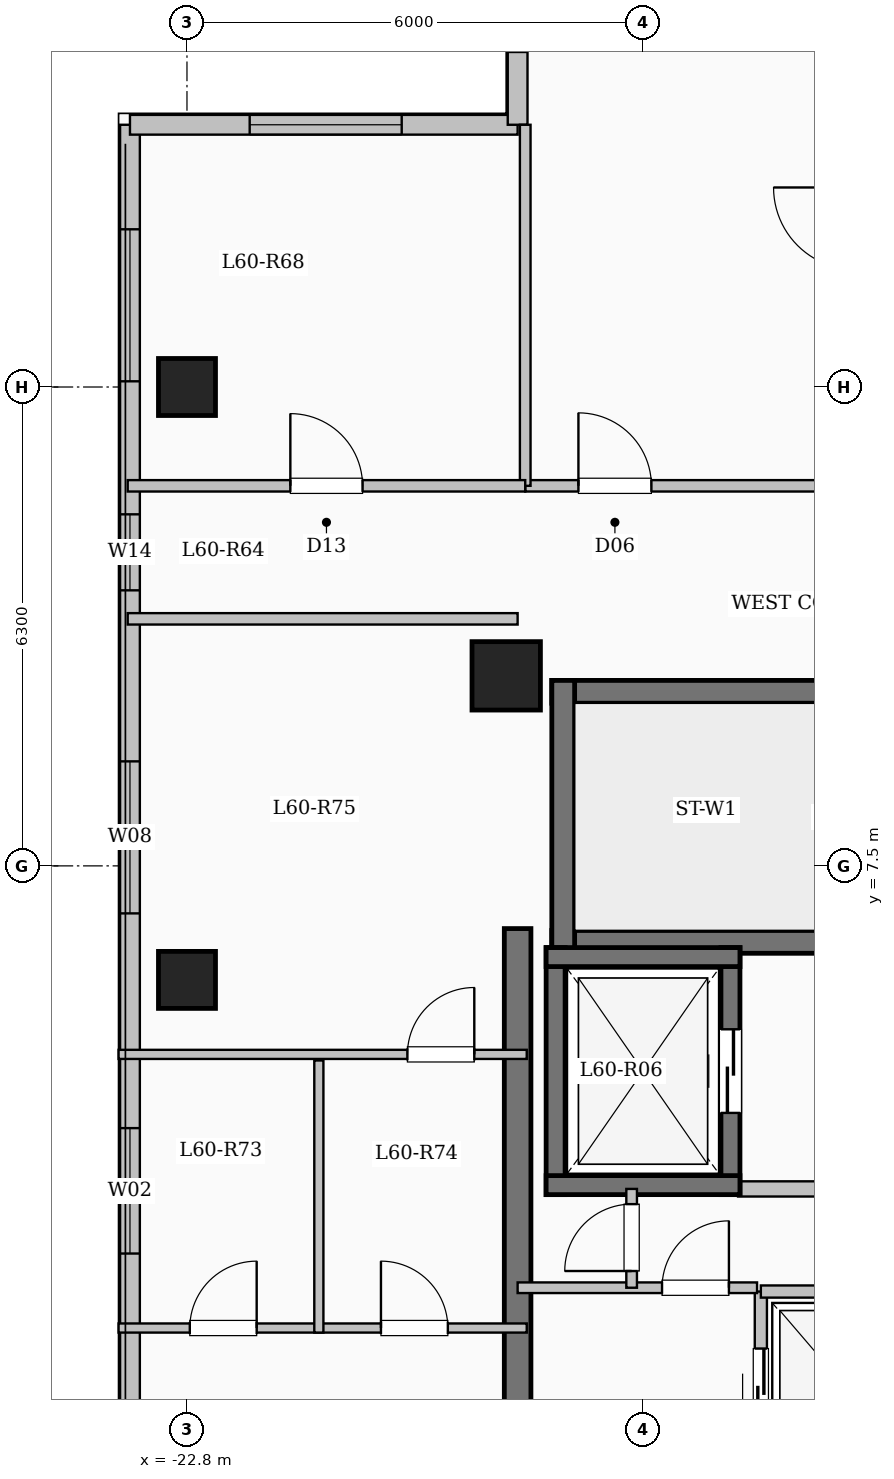
"""IFC4 building model, lengths in metres.
Left out: names, types, materials, properties, quantities, classifications, styles, units other than length and angle.
Written with IfcOpenShell. Run it as: python <this file> out.ifc"""

import sys

from ifc_helpers import new_model, si_unit, direction, frame, frame_2d, origin, origin_2d, place, context, subcontext, project, spatial, rectangle, extrude, element, fill, save


model = new_model("IFC4")
c1 = context("Model", 3, precision=1e-05, world=origin(), true_north=direction((0.0, 1.0)))
c2 = subcontext(c1, "Body", "Model", "MODEL_VIEW")
j1 = project(units=[si_unit("LENGTHUNIT", "METRE"), si_unit("PLANEANGLEUNIT", "RADIAN")], contexts=[c1])
p1 = place(None, origin())
s1 = spatial("IfcSite", under=j1, at=p1, CompositionType="ELEMENT")
p2 = place(p1, origin())
s2 = spatial("IfcBuilding", under=s1, at=p2, CompositionType="ELEMENT")
p3 = place(p2, frame((0.0, 0.0, 220.4)))
s3 = spatial("IfcBuildingStorey", under=s2, at=p3, CompositionType="ELEMENT", Elevation=220.4)
p4 = place(p3, frame((-18.6, 10.0, 0.0), z_axis=(0.0, 0.0, 1.0), x_axis=(1.0, 0.0, 0.0)))
e1 = element("IfcColumn", 1, at=p4, inside=s3, PredefinedType="COLUMN", context=c2, shape_type="SweptSolid", body=[
    extrude(rectangle(XDim=0.9, YDim=0.9, at=origin_2d()), origin(), (0.0, 0.0, 1.0), 3.35),
])
for number, where, z_axis, x_axis in (
    (2, (-22.8, 6.0, 0.0), (0.0, 0.0, 1.0), (1.0, 0.0, 0.0)),
    (3, (-22.8, 13.8, 0.0), (0.0, 0.0, 1.0), (1.0, 0.0, 0.0)),
):
    element("IfcColumn", number, at=place(p3, frame(where, z_axis=z_axis, x_axis=x_axis)), inside=s3, PredefinedType="COLUMN", context=c2, shape_type="SweptSolid", body=[
        extrude(rectangle(XDim=0.75, YDim=0.75, at=origin_2d()), origin(), (0.0, 0.0, 1.0), 3.35),
    ])
p5 = place(p3, frame((-23.55, -17.25, 0.0), z_axis=(0.0, 0.0, 1.0), x_axis=(0.0, 1.0, 0.0)))
e4 = element("IfcWall", 4, at=p5, inside=s3, PredefinedType="SOLIDWALL", context=c2, shape_type="SweptSolid", body=[
    extrude(rectangle(XDim=34.5, YDim=0.26, at=frame_2d((17.25, 0.0))), origin(), (0.0, 0.0, 1.0), 3.1),
])
p6 = place(p5, frame((2.825, 0.0, 0.9)))
e5 = element("IfcOpeningElement", 5, at=p6, cuts=e4, PredefinedType="OPENING", context=c2, shape_type="SweptSolid", body=[
    extrude(rectangle(XDim=2.2, YDim=1.75, at=frame_2d((1.1, 0.875))), frame((0.0, 0.14, 0.0), z_axis=(0.0, -1.0, 0.0), x_axis=(1.0, 0.0, 0.0)), (0.0, 0.0, 1.0), 0.28),
])
p7 = place(p5, frame((8.325, 0.0, 0.95)))
e6 = element("IfcOpeningElement", 6, at=p7, cuts=e4, PredefinedType="OPENING", context=c2, shape_type="SweptSolid", body=[
    extrude(rectangle(XDim=1.2, YDim=1.5, at=frame_2d((0.6, 0.75))), frame((0.0, 0.14, 0.0), z_axis=(0.0, -1.0, 0.0), x_axis=(1.0, 0.0, 0.0)), (0.0, 0.0, 1.0), 0.28),
])
p8 = place(p5, frame((13.25, 0.0, 0.9)))
e7 = element("IfcOpeningElement", 7, at=p8, cuts=e4, PredefinedType="OPENING", context=c2, shape_type="SweptSolid", body=[
    extrude(rectangle(XDim=2.2, YDim=1.75, at=frame_2d((1.1, 0.875))), frame((0.0, 0.14, 0.0), z_axis=(0.0, -1.0, 0.0), x_axis=(1.0, 0.0, 0.0)), (0.0, 0.0, 1.0), 0.28),
])
p9 = place(p5, frame((19.65, 0.0, 0.9)))
e8 = element("IfcOpeningElement", 8, at=p9, cuts=e4, PredefinedType="OPENING", context=c2, shape_type="SweptSolid", body=[
    extrude(rectangle(XDim=1.65, YDim=1.6, at=frame_2d((0.825, 0.8))), frame((0.0, 0.14, 0.0), z_axis=(0.0, -1.0, 0.0), x_axis=(1.0, 0.0, 0.0)), (0.0, 0.0, 1.0), 0.28),
])
p10 = place(p5, frame((24.125, 0.0, 0.9)))
e9 = element("IfcOpeningElement", 9, at=p10, cuts=e4, PredefinedType="OPENING", context=c2, shape_type="SweptSolid", body=[
    extrude(rectangle(XDim=2.0, YDim=1.7, at=frame_2d((1.0, 0.85))), frame((0.0, 0.14, 0.0), z_axis=(0.0, -1.0, 0.0), x_axis=(1.0, 0.0, 0.0)), (0.0, 0.0, 1.0), 0.28),
])
p11 = place(p5, frame((28.375, 0.0, 0.95)))
e10 = element("IfcOpeningElement", 10, at=p11, cuts=e4, PredefinedType="OPENING", context=c2, shape_type="SweptSolid", body=[
    extrude(rectangle(XDim=1.0, YDim=1.5, at=frame_2d((0.5, 0.75))), frame((0.0, 0.14, 0.0), z_axis=(0.0, -1.0, 0.0), x_axis=(1.0, 0.0, 0.0)), (0.0, 0.0, 1.0), 0.28),
])
p12 = place(p5, frame((31.125, 0.0, 0.9)))
e11 = element("IfcOpeningElement", 11, at=p12, cuts=e4, PredefinedType="OPENING", context=c2, shape_type="SweptSolid", body=[
    extrude(rectangle(XDim=2.0, YDim=1.7, at=frame_2d((1.0, 0.85))), frame((0.0, 0.14, 0.0), z_axis=(0.0, -1.0, 0.0), x_axis=(1.0, 0.0, 0.0)), (0.0, 0.0, 1.0), 0.28),
])
p13 = place(p3, frame((-23.55, 17.25, 0.0), z_axis=(0.0, 0.0, 1.0), x_axis=(1.0, 0.0, 0.0)))
e12 = element("IfcWall", 12, at=p13, inside=s3, PredefinedType="SOLIDWALL", context=c2, shape_type="SweptSolid", body=[
    extrude(rectangle(XDim=5.1, YDim=0.26, at=frame_2d((2.55, 0.0))), origin(), (0.0, 0.0, 1.0), 3.1),
])
p14 = place(p13, frame((1.575, 0.0, 0.9)))
e13 = element("IfcOpeningElement", 13, at=p14, cuts=e12, PredefinedType="OPENING", context=c2, shape_type="SweptSolid", body=[
    extrude(rectangle(XDim=2.0, YDim=1.7, at=frame_2d((1.0, 0.85))), frame((0.0, 0.14, 0.0), z_axis=(0.0, -1.0, 0.0), x_axis=(1.0, 0.0, 0.0)), (0.0, 0.0, 1.0), 0.28),
])
p15 = place(p3, frame((-18.45, 17.25, 0.0), z_axis=(0.0, 0.0, 1.0), x_axis=(0.0, 1.0, 0.0)))
e14 = element("IfcWall", 14, at=p15, inside=s3, PredefinedType="SOLIDWALL", context=c2, shape_type="SweptSolid", body=[
    extrude(rectangle(XDim=3.6, YDim=0.26, at=frame_2d((1.8, 0.0))), origin(), (0.0, 0.0, 1.0), 3.1),
])
p16 = place(p15, frame((0.958, 0.0, 0.9)))
e15 = element("IfcOpeningElement", 15, at=p16, cuts=e14, PredefinedType="OPENING", context=c2, shape_type="SweptSolid", body=[
    extrude(rectangle(XDim=1.65, YDim=1.6, at=frame_2d((0.825, 0.8))), frame((0.0, 0.14, 0.0), z_axis=(0.0, -1.0, 0.0), x_axis=(1.0, 0.0, 0.0)), (0.0, 0.0, 1.0), 0.28),
])
p17 = place(p3, frame((-18.0, 9.79, 0.0), z_axis=(0.0, 0.0, 1.0), x_axis=(1.0, 0.0, 0.0)))
e16 = element("IfcWall", 16, at=p17, inside=s3, PredefinedType="SHEAR", context=c2, shape_type="SweptSolid", body=[
    extrude(rectangle(XDim=8.0, YDim=0.3, at=frame_2d((4.0, 0.0))), origin(), (0.0, 0.0, 1.0), 3.35),
])
p18 = place(p3, frame((-18.0, 6.5, 0.0), z_axis=(0.0, 0.0, 1.0), x_axis=(1.0, 0.0, 0.0)))
e17 = element("IfcWall", 17, at=p18, inside=s3, PredefinedType="SHEAR", context=c2, shape_type="SweptSolid", body=[
    extrude(rectangle(XDim=8.0, YDim=0.3, at=frame_2d((4.0, 0.0))), origin(), (0.0, 0.0, 1.0), 3.35),
])
p19 = place(p18, frame((6.45, 0.0, 0.0)))
e18 = element("IfcOpeningElement", 18, at=p19, cuts=e17, PredefinedType="OPENING", context=c2, shape_type="SweptSolid", body=[
    extrude(rectangle(XDim=1.0, YDim=2.15, at=frame_2d((0.5, 1.075))), frame((0.0, 0.16, 0.0), z_axis=(0.0, -1.0, 0.0), x_axis=(1.0, 0.0, 0.0)), (0.0, 0.0, 1.0), 0.32),
])
p20 = place(p3, frame((-17.85, 6.35, 0.0), z_axis=(0.0, 0.0, 1.0), x_axis=(0.0, 1.0, 0.0)))
e19 = element("IfcWall", 19, at=p20, inside=s3, PredefinedType="SHEAR", context=c2, shape_type="SweptSolid", body=[
    extrude(rectangle(XDim=3.59, YDim=0.3, at=frame_2d((1.795, 0.0))), origin(), (0.0, 0.0, 1.0), 3.35),
])
p21 = place(p3, frame((-15.55, 3.25, 0.0), z_axis=(0.0, 0.0, 1.0), x_axis=(1.0, 0.0, 0.0)))
e20 = element("IfcWall", 20, at=p21, inside=s3, PredefinedType="SOLIDWALL", context=c2, shape_type="SweptSolid", body=[
    extrude(rectangle(XDim=5.4, YDim=0.2, at=frame_2d((2.7, 0.0))), origin(), (0.0, 0.0, 1.0), 3.1),
])
p22 = place(p3, frame((-17.95, 3.175, 0.0), z_axis=(0.0, 0.0, 1.0), x_axis=(0.0, 1.0, 0.0)))
e21 = element("IfcWall", 21, at=p22, inside=s3, PredefinedType="SHEAR", context=c2, shape_type="SweptSolid", body=[
    extrude(rectangle(XDim=3.25, YDim=0.25, at=frame_2d((1.625, 0.0))), origin(), (0.0, 0.0, 1.0), 3.35),
])
p23 = place(p3, frame((-15.65, 3.175, 0.0), z_axis=(0.0, 0.0, 1.0), x_axis=(0.0, 1.0, 0.0)))
e22 = element("IfcWall", 22, at=p23, inside=s3, PredefinedType="SHEAR", context=c2, shape_type="SweptSolid", body=[
    extrude(rectangle(XDim=3.25, YDim=0.25, at=frame_2d((1.625, 0.0))), origin(), (0.0, 0.0, 1.0), 3.35),
])
p24 = place(p23, frame((1.075, 0.0, 0.0)))
e23 = element("IfcOpeningElement", 23, at=p24, cuts=e22, PredefinedType="OPENING", context=c2, shape_type="SweptSolid", body=[
    extrude(rectangle(XDim=1.1, YDim=2.15, at=frame_2d((0.55, 1.075))), frame((0.0, 0.135, 0.0), z_axis=(0.0, -1.0, 0.0), x_axis=(1.0, 0.0, 0.0)), (0.0, 0.0, 1.0), 0.27),
])
for number, where, z_axis, x_axis in (
    (24, (-18.075, 3.3, 0.0), (0.0, 0.0, 1.0), (1.0, 0.0, 0.0)),
    (25, (-18.075, 6.3, 0.0), (0.0, 0.0, 1.0), (1.0, 0.0, 0.0)),
):
    element("IfcWall", number, at=place(p3, frame(where, z_axis=z_axis, x_axis=x_axis)), inside=s3, PredefinedType="SHEAR", context=c2, shape_type="SweptSolid", body=[
        extrude(rectangle(XDim=2.55, YDim=0.25, at=frame_2d((1.275, 0.0))), origin(), (0.0, 0.0, 1.0), 3.35),
    ])
p25 = place(p3, frame((-15.25, -0.7, 0.0), z_axis=(0.0, 0.0, 1.0), x_axis=(0.0, 1.0, 0.0)))
e26 = element("IfcWall", 26, at=p25, inside=s3, PredefinedType="SOLIDWALL", context=c2, shape_type="SweptSolid", body=[
    extrude(rectangle(XDim=2.6, YDim=0.16, at=frame_2d((1.3, 0.0))), origin(), (0.0, 0.0, 1.0), 3.1),
])
p26 = place(p25, frame((0.75, 0.0, 0.0)))
e27 = element("IfcOpeningElement", 27, at=p26, cuts=e26, PredefinedType="OPENING", context=c2, shape_type="SweptSolid", body=[
    extrude(rectangle(XDim=1.1, YDim=2.15, at=frame_2d((0.55, 1.075))), frame((0.0, 0.09, 0.0), z_axis=(0.0, -1.0, 0.0), x_axis=(1.0, 0.0, 0.0)), (0.0, 0.0, 1.0), 0.18),
])
p27 = place(p3, frame((-15.25, 1.9, 0.0), z_axis=(0.0, 0.0, 1.0), x_axis=(1.0, 0.0, 0.0)))
e28 = element("IfcWall", 28, at=p27, inside=s3, PredefinedType="SOLIDWALL", context=c2, shape_type="SweptSolid", body=[
    extrude(rectangle(XDim=2.3, YDim=0.16, at=frame_2d((1.15, 0.0))), origin(), (0.0, 0.0, 1.0), 3.1),
])
p28 = place(p3, frame((-18.45, -7.375, 0.0), z_axis=(0.0, 0.0, 1.0), x_axis=(0.0, 1.0, 0.0)))
e29 = element("IfcWall", 29, at=p28, inside=s3, PredefinedType="SHEAR", context=c2, shape_type="SweptSolid", body=[
    extrude(rectangle(XDim=14.05, YDim=0.35, at=frame_2d((7.025, 0.0))), origin(), (0.0, 0.0, 1.0), 3.35),
])
p29 = place(p3, frame((-18.45, 1.95, 0.0), z_axis=(0.0, 0.0, 1.0), x_axis=(1.0, 0.0, 0.0)))
e30 = element("IfcWall", 30, at=p29, inside=s3, PredefinedType="PARTITIONING", context=c2, shape_type="SweptSolid", body=[
    extrude(rectangle(XDim=3.15, YDim=0.14, at=frame_2d((1.575, 0.0))), origin(), (0.0, 0.0, 1.0), 3.1),
])
p30 = place(p29, frame((1.9, 0.0, 0.0)))
e31 = element("IfcOpeningElement", 31, at=p30, cuts=e30, PredefinedType="OPENING", context=c2, shape_type="SweptSolid", body=[
    extrude(rectangle(XDim=0.88, YDim=2.1, at=frame_2d((0.44, 1.05))), frame((0.0, 0.08, 0.0), z_axis=(0.0, -1.0, 0.0), x_axis=(1.0, 0.0, 0.0)), (0.0, 0.0, 1.0), 0.16),
])
p31 = place(p3, frame((-16.95, 1.95, 0.0), z_axis=(0.0, 0.0, 1.0), x_axis=(0.0, 1.0, 0.0)))
e32 = element("IfcWall", 32, at=p31, inside=s3, PredefinedType="PARTITIONING", context=c2, shape_type="SweptSolid", body=[
    extrude(rectangle(XDim=1.3, YDim=0.14, at=frame_2d((0.65, 0.0))), origin(), (0.0, 0.0, 1.0), 3.1),
])
p32 = place(p31, frame((0.22, 0.0, 0.0)))
e33 = element("IfcOpeningElement", 33, at=p32, cuts=e32, PredefinedType="OPENING", context=c2, shape_type="SweptSolid", body=[
    extrude(rectangle(XDim=0.88, YDim=2.1, at=frame_2d((0.44, 1.05))), frame((0.0, 0.08, 0.0), z_axis=(0.0, -1.0, 0.0), x_axis=(1.0, 0.0, 0.0)), (0.0, 0.0, 1.0), 0.16),
])
p33 = place(p3, frame((-18.35, 12.5, 0.0), z_axis=(0.0, 0.0, 1.0), x_axis=(1.0, 0.0, 0.0)))
e34 = element("IfcWall", 34, at=p33, inside=s3, PredefinedType="PARTITIONING", context=c2, shape_type="SweptSolid", body=[
    extrude(rectangle(XDim=14.5, YDim=0.15, at=frame_2d((7.25, 0.0))), origin(), (0.0, 0.0, 1.0), 3.1),
])
p34 = place(p33, frame((0.7, 0.0, 0.0)))
e35 = element("IfcOpeningElement", 35, at=p34, cuts=e34, PredefinedType="OPENING", context=c2, shape_type="SweptSolid", body=[
    extrude(rectangle(XDim=0.96, YDim=2.15, at=frame_2d((0.48, 1.075))), frame((0.0, 0.085, 0.0), z_axis=(0.0, -1.0, 0.0), x_axis=(1.0, 0.0, 0.0)), (0.0, 0.0, 1.0), 0.17),
])
p35 = place(p33, frame((9.394, 0.0, 0.0)))
e36 = element("IfcOpeningElement", 36, at=p35, cuts=e34, PredefinedType="OPENING", context=c2, shape_type="SweptSolid", body=[
    extrude(rectangle(XDim=0.96, YDim=2.15, at=frame_2d((0.48, 1.075))), frame((0.0, 0.085, 0.0), z_axis=(0.0, -1.0, 0.0), x_axis=(1.0, 0.0, 0.0)), (0.0, 0.0, 1.0), 0.17),
])
p36 = place(p3, frame((-23.58, 10.75, 0.0), z_axis=(0.0, 0.0, 1.0), x_axis=(1.0, 0.0, 0.0)))
e37 = element("IfcWall", 37, at=p36, inside=s3, PredefinedType="PARTITIONING", context=c2, shape_type="SweptSolid", body=[
    extrude(rectangle(XDim=5.13, YDim=0.15, at=frame_2d((2.565, 0.0))), origin(), (0.0, 0.0, 1.0), 3.1),
])
p37 = place(p3, frame((-18.35, 12.5, 0.0), z_axis=(0.0, 0.0, 1.0), x_axis=(0.0, 1.0, 0.0)))
e38 = element("IfcWall", 38, at=p37, inside=s3, PredefinedType="PARTITIONING", context=c2, shape_type="SweptSolid", body=[
    extrude(rectangle(XDim=4.75, YDim=0.14, at=frame_2d((2.375, 0.0))), origin(), (0.0, 0.0, 1.0), 3.1),
])
p38 = place(p3, frame((-23.58, 12.5, 0.0), z_axis=(0.0, 0.0, 1.0), x_axis=(1.0, 0.0, 0.0)))
e39 = element("IfcWall", 39, at=p38, inside=s3, PredefinedType="PARTITIONING", context=c2, shape_type="SweptSolid", body=[
    extrude(rectangle(XDim=5.23, YDim=0.15, at=frame_2d((2.615, 0.0))), origin(), (0.0, 0.0, 1.0), 3.1),
])
p39 = place(p38, frame((2.14, 0.0, 0.0)))
e40 = element("IfcOpeningElement", 40, at=p39, cuts=e39, PredefinedType="OPENING", context=c2, shape_type="SweptSolid", body=[
    extrude(rectangle(XDim=0.95, YDim=2.15, at=frame_2d((0.475, 1.075))), frame((0.0, 0.085, 0.0), z_axis=(0.0, -1.0, 0.0), x_axis=(1.0, 0.0, 0.0)), (0.0, 0.0, 1.0), 0.17),
])
p40 = place(p3, frame((-23.7, 1.42, 0.0), z_axis=(0.0, 0.0, 1.0), x_axis=(1.0, 0.0, 0.0)))
e41 = element("IfcWall", 41, at=p40, inside=s3, PredefinedType="PARTITIONING", context=c2, shape_type="SweptSolid", body=[
    extrude(rectangle(XDim=5.37, YDim=0.12, at=frame_2d((2.685, 0.0))), origin(), (0.0, 0.0, 1.0), 3.1),
])
p41 = place(p40, frame((0.937, 0.0, 0.0)))
e42 = element("IfcOpeningElement", 42, at=p41, cuts=e41, PredefinedType="OPENING", context=c2, shape_type="SweptSolid", body=[
    extrude(rectangle(XDim=0.88, YDim=2.1, at=frame_2d((0.44, 1.05))), frame((0.0, 0.07, 0.0), z_axis=(0.0, -1.0, 0.0), x_axis=(1.0, 0.0, 0.0)), (0.0, 0.0, 1.0), 0.14),
])
p42 = place(p40, frame((3.452, 0.0, 0.0)))
e43 = element("IfcOpeningElement", 43, at=p42, cuts=e41, PredefinedType="OPENING", context=c2, shape_type="SweptSolid", body=[
    extrude(rectangle(XDim=0.88, YDim=2.1, at=frame_2d((0.44, 1.05))), frame((0.0, 0.07, 0.0), z_axis=(0.0, -1.0, 0.0), x_axis=(1.0, 0.0, 0.0)), (0.0, 0.0, 1.0), 0.14),
])
p43 = place(p3, frame((-23.7, 5.02, 0.0), z_axis=(0.0, 0.0, 1.0), x_axis=(1.0, 0.0, 0.0)))
e44 = element("IfcWall", 44, at=p43, inside=s3, PredefinedType="PARTITIONING", context=c2, shape_type="SweptSolid", body=[
    extrude(rectangle(XDim=5.37, YDim=0.12, at=frame_2d((2.685, 0.0))), origin(), (0.0, 0.0, 1.0), 3.1),
])
p44 = place(p43, frame((3.8, 0.0, 0.0)))
e45 = element("IfcOpeningElement", 45, at=p44, cuts=e44, PredefinedType="OPENING", context=c2, shape_type="SweptSolid", body=[
    extrude(rectangle(XDim=0.88, YDim=2.1, at=frame_2d((0.44, 1.05))), frame((0.0, 0.07, 0.0), z_axis=(0.0, -1.0, 0.0), x_axis=(1.0, 0.0, 0.0)), (0.0, 0.0, 1.0), 0.14),
])
p45 = place(p3, frame((-21.065, 1.36, 0.0), z_axis=(0.0, 0.0, 1.0), x_axis=(0.0, 1.0, 0.0)))
e46 = element("IfcWall", 46, at=p45, inside=s3, PredefinedType="PARTITIONING", context=c2, shape_type="SweptSolid", body=[
    extrude(rectangle(XDim=3.58, YDim=0.12, at=frame_2d((1.79, 0.0))), origin(), (0.0, 0.0, 1.0), 3.1),
])
p46 = place(p9, origin())
e47 = element("IfcWindow", 47, at=p46, inside=s3, PartitioningType="SINGLE_PANEL", PredefinedType="WINDOW", context=c2, shape_type="SweptSolid", body=[
    extrude(rectangle(XDim=1.65, YDim=1.6, at=frame_2d((0.825, 0.8))), frame((0.0, 0.03, 0.0), z_axis=(0.0, -1.0, 0.0), x_axis=(1.0, 0.0, 0.0)), (0.0, 0.0, 1.0), 0.06),
])
fill(e8, e47)
p47 = place(p10, origin())
e48 = element("IfcWindow", 48, at=p47, inside=s3, PartitioningType="SINGLE_PANEL", PredefinedType="WINDOW", context=c2, shape_type="SweptSolid", body=[
    extrude(rectangle(XDim=2.0, YDim=1.7, at=frame_2d((1.0, 0.85))), frame((0.0, 0.03, 0.0), z_axis=(0.0, -1.0, 0.0), x_axis=(1.0, 0.0, 0.0)), (0.0, 0.0, 1.0), 0.06),
])
fill(e9, e48)
p48 = place(p11, origin())
e49 = element("IfcWindow", 49, at=p48, inside=s3, PartitioningType="SINGLE_PANEL", PredefinedType="WINDOW", context=c2, shape_type="SweptSolid", body=[
    extrude(rectangle(XDim=1.0, YDim=1.5, at=frame_2d((0.5, 0.75))), frame((0.0, 0.03, 0.0), z_axis=(0.0, -1.0, 0.0), x_axis=(1.0, 0.0, 0.0)), (0.0, 0.0, 1.0), 0.06),
])
fill(e10, e49)
p49 = place(p12, origin())
e50 = element("IfcWindow", 50, at=p49, inside=s3, PartitioningType="SINGLE_PANEL", PredefinedType="WINDOW", context=c2, shape_type="SweptSolid", body=[
    extrude(rectangle(XDim=2.0, YDim=1.7, at=frame_2d((1.0, 0.85))), frame((0.0, 0.03, 0.0), z_axis=(0.0, -1.0, 0.0), x_axis=(1.0, 0.0, 0.0)), (0.0, 0.0, 1.0), 0.06),
])
fill(e11, e50)
p50 = place(p14, origin())
e51 = element("IfcWindow", 51, at=p50, inside=s3, PartitioningType="SINGLE_PANEL", PredefinedType="WINDOW", context=c2, shape_type="SweptSolid", body=[
    extrude(rectangle(XDim=2.0, YDim=1.7, at=frame_2d((1.0, 0.85))), frame((0.0, 0.03, 0.0), z_axis=(0.0, -1.0, 0.0), x_axis=(1.0, 0.0, 0.0)), (0.0, 0.0, 1.0), 0.06),
])
fill(e13, e51)
p51 = place(p24, origin())
e52 = element("IfcDoor", 52, at=p51, inside=s3, OperationType="SLIDING_TO_LEFT", PredefinedType="DOOR", context=c2, shape_type="SweptSolid", body=[
    extrude(rectangle(XDim=1.1, YDim=2.15, at=frame_2d((0.55, 1.075))), frame((0.0, 0.025, 0.0), z_axis=(0.0, -1.0, 0.0), x_axis=(1.0, 0.0, 0.0)), (0.0, 0.0, 1.0), 0.05),
])
fill(e23, e52)
p52 = place(p26, origin())
e53 = element("IfcDoor", 53, at=p52, inside=s3, OperationType="SLIDING_TO_LEFT", PredefinedType="DOOR", context=c2, shape_type="SweptSolid", body=[
    extrude(rectangle(XDim=1.1, YDim=2.15, at=frame_2d((0.55, 1.075))), frame((0.0, 0.025, 0.0), z_axis=(0.0, -1.0, 0.0), x_axis=(1.0, 0.0, 0.0)), (0.0, 0.0, 1.0), 0.05),
])
fill(e27, e53)
p53 = place(p30, origin())
e54 = element("IfcDoor", 54, at=p53, inside=s3, OperationType="SINGLE_SWING_RIGHT", PredefinedType="DOOR", context=c2, shape_type="SweptSolid", body=[
    extrude(rectangle(XDim=0.88, YDim=2.1, at=frame_2d((0.44, 1.05))), frame((0.0, 0.025, 0.0), z_axis=(0.0, -1.0, 0.0), x_axis=(1.0, 0.0, 0.0)), (0.0, 0.0, 1.0), 0.05),
])
fill(e31, e54)
p54 = place(p32, origin())
e55 = element("IfcDoor", 55, at=p54, inside=s3, OperationType="SINGLE_SWING_LEFT", PredefinedType="DOOR", context=c2, shape_type="SweptSolid", body=[
    extrude(rectangle(XDim=0.88, YDim=2.1, at=frame_2d((0.44, 1.05))), frame((0.0, 0.025, 0.0), z_axis=(0.0, -1.0, 0.0), x_axis=(1.0, 0.0, 0.0)), (0.0, 0.0, 1.0), 0.05),
])
fill(e33, e55)
p55 = place(p34, origin())
e56 = element("IfcDoor", 56, at=p55, inside=s3, OperationType="SINGLE_SWING_LEFT", PredefinedType="DOOR", context=c2, shape_type="SweptSolid", body=[
    extrude(rectangle(XDim=0.96, YDim=2.15, at=frame_2d((0.48, 1.075))), frame((0.0, 0.025, 0.0), z_axis=(0.0, -1.0, 0.0), x_axis=(1.0, 0.0, 0.0)), (0.0, 0.0, 1.0), 0.05),
])
fill(e35, e56)
p56 = place(p39, origin())
e57 = element("IfcDoor", 57, at=p56, inside=s3, OperationType="SINGLE_SWING_LEFT", PredefinedType="DOOR", context=c2, shape_type="SweptSolid", body=[
    extrude(rectangle(XDim=0.95, YDim=2.15, at=frame_2d((0.475, 1.075))), frame((0.0, 0.025, 0.0), z_axis=(0.0, -1.0, 0.0), x_axis=(1.0, 0.0, 0.0)), (0.0, 0.0, 1.0), 0.05),
])
fill(e40, e57)
p57 = place(p41, origin())
e58 = element("IfcDoor", 58, at=p57, inside=s3, OperationType="SINGLE_SWING_RIGHT", PredefinedType="DOOR", context=c2, shape_type="SweptSolid", body=[
    extrude(rectangle(XDim=0.88, YDim=2.1, at=frame_2d((0.44, 1.05))), frame((0.0, 0.025, 0.0), z_axis=(0.0, -1.0, 0.0), x_axis=(1.0, 0.0, 0.0)), (0.0, 0.0, 1.0), 0.05),
])
fill(e42, e58)
p58 = place(p42, origin())
e59 = element("IfcDoor", 59, at=p58, inside=s3, OperationType="SINGLE_SWING_LEFT", PredefinedType="DOOR", context=c2, shape_type="SweptSolid", body=[
    extrude(rectangle(XDim=0.88, YDim=2.1, at=frame_2d((0.44, 1.05))), frame((0.0, 0.025, 0.0), z_axis=(0.0, -1.0, 0.0), x_axis=(1.0, 0.0, 0.0)), (0.0, 0.0, 1.0), 0.05),
])
fill(e43, e59)
p59 = place(p44, origin())
e60 = element("IfcDoor", 60, at=p59, inside=s3, OperationType="SINGLE_SWING_RIGHT", PredefinedType="DOOR", context=c2, shape_type="SweptSolid", body=[
    extrude(rectangle(XDim=0.88, YDim=2.1, at=frame_2d((0.44, 1.05))), frame((0.0, 0.025, 0.0), z_axis=(0.0, -1.0, 0.0), x_axis=(1.0, 0.0, 0.0)), (0.0, 0.0, 1.0), 0.05),
])
fill(e45, e60)
save(model, sys.argv[1])
